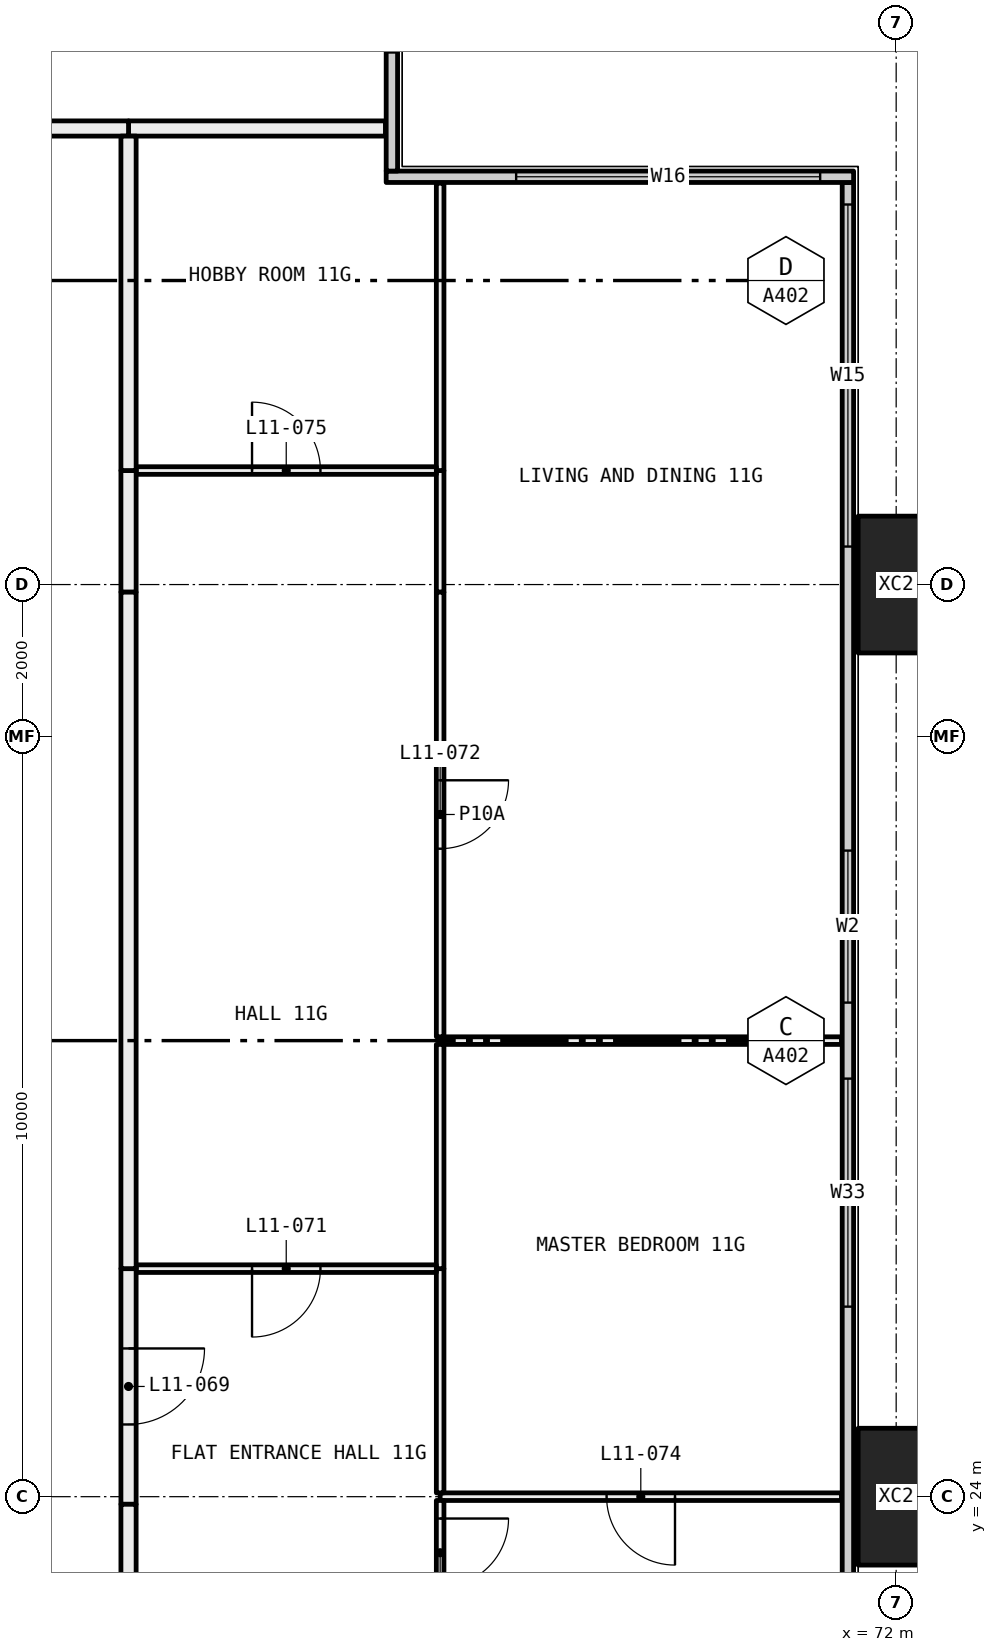
"""IFC4 building model, lengths in metres.
Left out: names, types, materials, properties, quantities, classifications, styles, units other than length and angle.
Written with IfcOpenShell. Run it as: python <this file> out.ifc"""

import sys

from ifc_helpers import new_model, si_unit, direction, frame, frame_2d, origin, origin_2d, place, context, subcontext, project, spatial, rectangle, hollow_rectangle, extrude, element, fill, save


model = new_model("IFC4")
c1 = context("Model", 3, precision=1e-05, world=origin(), true_north=direction((0.0, 1.0)))
c2 = subcontext(c1, "Body", "Model", "MODEL_VIEW")
j1 = project(units=[si_unit("LENGTHUNIT", "METRE"), si_unit("PLANEANGLEUNIT", "RADIAN")], contexts=[c1])
p1 = place(None, origin())
s1 = spatial("IfcSite", under=j1, at=p1, CompositionType="ELEMENT")
p2 = place(p1, origin())
s2 = spatial("IfcBuilding", under=s1, at=p2, CompositionType="ELEMENT")
p3 = place(p2, frame((0.0, 0.0, 50.7)))
s3 = spatial("IfcBuildingStorey", under=s2, at=p3, CompositionType="ELEMENT", Elevation=50.7)
for number, where, z_axis, x_axis in (
    (1, (72.0, 24.0, -0.4), (0.0, 0.0, 1.0), (0.0, 1.0, 0.0)),
    (2, (72.0, 36.0, -0.4), (0.0, 0.0, 1.0), (0.0, 1.0, 0.0)),
):
    element("IfcColumn", number, at=place(p3, frame(where, z_axis=z_axis, x_axis=x_axis)), inside=s3, PredefinedType="COLUMN", context=c2, shape_type="SweptSolid", body=[
        extrude(hollow_rectangle(XDim=1.8, YDim=1.0, WallThickness=0.07, at=origin_2d()), origin(), (0.0, 0.0, 1.0), 3.45),
    ])
p4 = place(p3, frame((71.365, 6.71, 0.0), z_axis=(0.0, 0.0, 1.0), x_axis=(0.0, 1.0, 0.0)))
e3 = element("IfcWall", 3, at=p4, inside=s3, PredefinedType="ELEMENTEDWALL", context=c2, shape_type="SweptSolid", body=[
    extrude(rectangle(XDim=34.58, YDim=0.15, at=frame_2d((17.29, 0.0))), origin(), (0.0, 0.0, 1.0), 3.05),
])
p5 = place(p4, frame((0.29, 0.0, 0.45)))
e4 = element("IfcOpeningElement", 4, at=p5, cuts=e3, PredefinedType="OPENING", context=c2, shape_type="SweptSolid", body=[
    extrude(rectangle(XDim=4.5, YDim=2.55, at=frame_2d((2.25, 1.275))), frame((0.0, 0.085, 0.0), z_axis=(0.0, -1.0, 0.0), x_axis=(1.0, 0.0, 0.0)), (0.0, 0.0, 1.0), 0.17),
])
p6 = place(p4, frame((7.79, 0.0, 0.45)))
e5 = element("IfcOpeningElement", 5, at=p6, cuts=e3, PredefinedType="OPENING", context=c2, shape_type="SweptSolid", body=[
    extrude(rectangle(XDim=3.0, YDim=2.55, at=frame_2d((1.5, 1.275))), frame((0.0, 0.085, 0.0), z_axis=(0.0, -1.0, 0.0), x_axis=(1.0, 0.0, 0.0)), (0.0, 0.0, 1.0), 0.17),
])
p7 = place(p4, frame((11.79, 0.0, 0.45)))
e6 = element("IfcOpeningElement", 6, at=p7, cuts=e3, PredefinedType="OPENING", context=c2, shape_type="SweptSolid", body=[
    extrude(rectangle(XDim=3.0, YDim=2.55, at=frame_2d((1.5, 1.275))), frame((0.0, 0.085, 0.0), z_axis=(0.0, -1.0, 0.0), x_axis=(1.0, 0.0, 0.0)), (0.0, 0.0, 1.0), 0.17),
])
p8 = place(p4, frame((19.79, 0.0, 0.45)))
e7 = element("IfcOpeningElement", 7, at=p8, cuts=e3, PredefinedType="OPENING", context=c2, shape_type="SweptSolid", body=[
    extrude(rectangle(XDim=3.0, YDim=2.55, at=frame_2d((1.5, 1.275))), frame((0.0, 0.085, 0.0), z_axis=(0.0, -1.0, 0.0), x_axis=(1.0, 0.0, 0.0)), (0.0, 0.0, 1.0), 0.17),
])
p9 = place(p4, frame((23.79, 0.0, 0.45)))
e8 = element("IfcOpeningElement", 8, at=p9, cuts=e3, PredefinedType="OPENING", context=c2, shape_type="SweptSolid", body=[
    extrude(rectangle(XDim=2.0, YDim=2.55, at=frame_2d((1.0, 1.275))), frame((0.0, 0.085, 0.0), z_axis=(0.0, -1.0, 0.0), x_axis=(1.0, 0.0, 0.0)), (0.0, 0.0, 1.0), 0.17),
])
p10 = place(p4, frame((29.79, 0.0, 0.45)))
e9 = element("IfcOpeningElement", 9, at=p10, cuts=e3, PredefinedType="OPENING", context=c2, shape_type="SweptSolid", body=[
    extrude(rectangle(XDim=4.5, YDim=2.55, at=frame_2d((2.25, 1.275))), frame((0.0, 0.085, 0.0), z_axis=(0.0, -1.0, 0.0), x_axis=(1.0, 0.0, 0.0)), (0.0, 0.0, 1.0), 0.17),
])
p11 = place(p3, frame((65.29, 41.365, 0.0), z_axis=(0.0, 0.0, 1.0), x_axis=(1.0, 0.0, 0.0)))
e10 = element("IfcWall", 10, at=p11, inside=s3, PredefinedType="ELEMENTEDWALL", context=c2, shape_type="SweptSolid", body=[
    extrude(rectangle(XDim=6.15, YDim=0.15, at=frame_2d((3.075, 0.0))), origin(), (0.0, 0.0, 1.0), 3.05),
])
p12 = place(p11, frame((1.71, 0.0, 0.45)))
e11 = element("IfcOpeningElement", 11, at=p12, cuts=e10, PredefinedType="OPENING", context=c2, shape_type="SweptSolid", body=[
    extrude(rectangle(XDim=4.0, YDim=2.55, at=frame_2d((2.0, 1.275))), frame((0.0, 0.085, 0.0), z_axis=(0.0, -1.0, 0.0), x_axis=(1.0, 0.0, 0.0)), (0.0, 0.0, 1.0), 0.17),
])
p13 = place(p3, frame((65.365, 41.44, 0.0), z_axis=(0.0, 0.0, 1.0), x_axis=(0.0, 1.0, 0.0)))
e12 = element("IfcWall", 12, at=p13, inside=s3, PredefinedType="ELEMENTEDWALL", context=c2, shape_type="SweptSolid", body=[
    extrude(rectangle(XDim=5.85, YDim=0.15, at=frame_2d((2.925, 0.0))), origin(), (0.0, 0.0, 1.0), 3.05),
])
p14 = place(p13, frame((1.56, 0.0, 0.45)))
e13 = element("IfcOpeningElement", 13, at=p14, cuts=e12, PredefinedType="OPENING", context=c2, shape_type="SweptSolid", body=[
    extrude(rectangle(XDim=4.0, YDim=2.55, at=frame_2d((2.0, 1.275))), frame((0.0, 0.085, 0.0), z_axis=(0.0, -1.0, 0.0), x_axis=(1.0, 0.0, 0.0)), (0.0, 0.0, 1.0), 0.17),
])
p15 = place(p3, frame((61.9, 42.0, 0.0), z_axis=(0.0, 0.0, 1.0), x_axis=(1.0, 0.0, 0.0)))
e14 = element("IfcWall", 14, at=p15, inside=s3, PredefinedType="PARTITIONING", context=c2, shape_type="SweptSolid", body=[
    extrude(rectangle(XDim=3.38, YDim=0.2, at=frame_2d((1.69, 0.0))), origin(), (0.0, 0.0, 1.0), 3.05),
])
p16 = place(p3, frame((60.0, 42.0, 0.0), z_axis=(0.0, 0.0, 1.0), x_axis=(1.0, 0.0, 0.0)))
e15 = element("IfcWall", 15, at=p16, inside=s3, PredefinedType="PARTITIONING", context=c2, shape_type="SweptSolid", body=[
    extrude(rectangle(XDim=1.9, YDim=0.2, at=frame_2d((0.95, 0.0))), origin(), (0.0, 0.0, 1.0), 3.05),
])
p17 = place(p3, frame((71.28, 24.0, 0.0), z_axis=(0.0, 0.0, 1.0), x_axis=(-1.0, 0.0, 0.0)))
e16 = element("IfcWall", 16, at=p17, inside=s3, PredefinedType="PARTITIONING", context=c2, shape_type="SweptSolid", body=[
    extrude(rectangle(XDim=5.28, YDim=0.1, at=frame_2d((2.64, 0.0))), origin(), (0.0, 0.0, 1.0), 2.45),
])
p18 = place(p17, frame((2.19, 0.0, 0.0)))
e17 = element("IfcOpeningElement", 17, at=p18, cuts=e16, PredefinedType="OPENING", context=c2, shape_type="SweptSolid", body=[
    extrude(rectangle(XDim=0.9, YDim=2.1, at=frame_2d((0.45, 1.05))), frame((0.0, 0.06, 0.0), z_axis=(0.0, -1.0, 0.0), x_axis=(1.0, 0.0, 0.0)), (0.0, 0.0, 1.0), 0.12),
])
p19 = place(p3, frame((66.0, 23.95, 0.0), z_axis=(0.0, 0.0, 1.0), x_axis=(0.0, -1.0, 0.0)))
e18 = element("IfcWall", 18, at=p19, inside=s3, PredefinedType="PARTITIONING", context=c2, shape_type="SweptSolid", body=[
    extrude(rectangle(XDim=1.375, YDim=0.1, at=frame_2d((0.688, 0.0))), origin(), (0.0, 0.0, 1.0), 2.45),
])
p20 = place(p19, frame((0.238, 0.0, 0.0)))
e19 = element("IfcOpeningElement", 19, at=p20, cuts=e18, PredefinedType="OPENING", context=c2, shape_type="SweptSolid", body=[
    extrude(rectangle(XDim=0.9, YDim=2.1, at=frame_2d((0.45, 1.05))), frame((0.0, 0.06, 0.0), z_axis=(0.0, -1.0, 0.0), x_axis=(1.0, 0.0, 0.0)), (0.0, 0.0, 1.0), 0.12),
])
p21 = place(p3, frame((71.28, 30.0, 0.0), z_axis=(0.0, 0.0, 1.0), x_axis=(-1.0, 0.0, 0.0)))
e20 = element("IfcWall", 20, at=p21, inside=s3, PredefinedType="PARTITIONING", context=c2, shape_type="SweptSolid", body=[
    extrude(rectangle(XDim=5.28, YDim=0.1, at=frame_2d((2.64, 0.0))), origin(), (0.0, 0.0, 1.0), 3.05),
])
p22 = place(p3, frame((66.0, 27.0, 0.0), z_axis=(0.0, 0.0, 1.0), x_axis=(0.0, -1.0, 0.0)))
e21 = element("IfcWall", 21, at=p22, inside=s3, PredefinedType="PARTITIONING", context=c2, shape_type="SweptSolid", body=[
    extrude(rectangle(XDim=2.95, YDim=0.1, at=frame_2d((1.475, 0.0))), origin(), (0.0, 0.0, 1.0), 2.45),
])
p23 = place(p3, frame((66.0, 29.95, 0.0), z_axis=(0.0, 0.0, 1.0), x_axis=(0.0, -1.0, 0.0)))
e22 = element("IfcWall", 22, at=p23, inside=s3, PredefinedType="PARTITIONING", context=c2, shape_type="SweptSolid", body=[
    extrude(rectangle(XDim=2.95, YDim=0.1, at=frame_2d((1.475, 0.0))), origin(), (0.0, 0.0, 1.0), 3.05),
])
p24 = place(p3, frame((66.0, 37.5, 0.0), z_axis=(0.0, 0.0, 1.0), x_axis=(0.0, -1.0, 0.0)))
e23 = element("IfcWall", 23, at=p24, inside=s3, PredefinedType="PARTITIONING", context=c2, shape_type="SweptSolid", body=[
    extrude(rectangle(XDim=1.6, YDim=0.1, at=frame_2d((0.8, 0.0))), origin(), (0.0, 0.0, 1.0), 2.45),
])
p25 = place(p3, frame((66.0, 35.9, 0.0), z_axis=(0.0, 0.0, 1.0), x_axis=(0.0, -1.0, 0.0)))
e24 = element("IfcWall", 24, at=p25, inside=s3, PredefinedType="PARTITIONING", context=c2, shape_type="SweptSolid", body=[
    extrude(rectangle(XDim=5.85, YDim=0.1, at=frame_2d((2.925, 0.0))), origin(), (0.0, 0.0, 1.0), 3.05),
])
p26 = place(p25, frame((2.475, 0.0, 0.0)))
e25 = element("IfcOpeningElement", 25, at=p26, cuts=e24, PredefinedType="OPENING", context=c2, shape_type="SweptSolid", body=[
    extrude(rectangle(XDim=0.9, YDim=2.1, at=frame_2d((0.45, 1.05))), frame((0.0, 0.06, 0.0), z_axis=(0.0, -1.0, 0.0), x_axis=(1.0, 0.0, 0.0)), (0.0, 0.0, 1.0), 0.12),
])
p27 = place(p3, frame((66.0, 41.28, 0.0), z_axis=(0.0, 0.0, 1.0), x_axis=(0.0, -1.0, 0.0)))
e26 = element("IfcWall", 26, at=p27, inside=s3, PredefinedType="PARTITIONING", context=c2, shape_type="SweptSolid", body=[
    extrude(rectangle(XDim=3.78, YDim=0.1, at=frame_2d((1.89, 0.0))), origin(), (0.0, 0.0, 1.0), 3.05),
])
p28 = place(p3, frame((65.95, 27.0, 0.0), z_axis=(0.0, 0.0, 1.0), x_axis=(-1.0, 0.0, 0.0)))
e27 = element("IfcWall", 27, at=p28, inside=s3, PredefinedType="PARTITIONING", context=c2, shape_type="SweptSolid", body=[
    extrude(rectangle(XDim=3.95, YDim=0.1, at=frame_2d((1.975, 0.0))), origin(), (0.0, 0.0, 1.0), 3.05),
])
p29 = place(p28, frame((1.525, 0.0, 0.0)))
e28 = element("IfcOpeningElement", 28, at=p29, cuts=e27, PredefinedType="OPENING", context=c2, shape_type="SweptSolid", body=[
    extrude(rectangle(XDim=0.9, YDim=2.1, at=frame_2d((0.45, 1.05))), frame((0.0, 0.06, 0.0), z_axis=(0.0, -1.0, 0.0), x_axis=(1.0, 0.0, 0.0)), (0.0, 0.0, 1.0), 0.12),
])
p30 = place(p3, frame((61.9, 27.0, 0.0), z_axis=(0.0, 0.0, 1.0), x_axis=(0.0, -1.0, 0.0)))
e29 = element("IfcWall", 29, at=p30, inside=s3, PredefinedType="PARTITIONING", context=c2, shape_type="SweptSolid", body=[
    extrude(rectangle(XDim=3.1, YDim=0.2, at=frame_2d((1.55, 0.0))), origin(), (0.0, 0.0, 1.0), 2.45),
])
p31 = place(p30, frame((1.05, 0.0, 0.0)))
e30 = element("IfcOpeningElement", 30, at=p31, cuts=e29, PredefinedType="OPENING", context=c2, shape_type="SweptSolid", body=[
    extrude(rectangle(XDim=1.0, YDim=2.1, at=frame_2d((0.5, 1.05))), frame((0.0, 0.11, 0.0), z_axis=(0.0, -1.0, 0.0), x_axis=(1.0, 0.0, 0.0)), (0.0, 0.0, 1.0), 0.22),
])
p32 = place(p3, frame((61.9, 23.9, 0.0), z_axis=(0.0, 0.0, 1.0), x_axis=(0.0, -1.0, 0.0)))
e31 = element("IfcWall", 31, at=p32, inside=s3, PredefinedType="PARTITIONING", context=c2, shape_type="SweptSolid", body=[
    extrude(rectangle(XDim=1.4, YDim=0.2, at=frame_2d((0.7, 0.0))), origin(), (0.0, 0.0, 1.0), 3.05),
])
p33 = place(p3, frame((65.95, 37.5, 0.0), z_axis=(0.0, 0.0, 1.0), x_axis=(-1.0, 0.0, 0.0)))
e32 = element("IfcWall", 32, at=p33, inside=s3, PredefinedType="PARTITIONING", context=c2, shape_type="SweptSolid", body=[
    extrude(rectangle(XDim=3.95, YDim=0.1, at=frame_2d((1.975, 0.0))), origin(), (0.0, 0.0, 1.0), 3.05),
])
p34 = place(p33, frame((1.525, 0.0, 0.0)))
e33 = element("IfcOpeningElement", 33, at=p34, cuts=e32, PredefinedType="OPENING", context=c2, shape_type="SweptSolid", body=[
    extrude(rectangle(XDim=0.9, YDim=2.1, at=frame_2d((0.45, 1.05))), frame((0.0, 0.06, 0.0), z_axis=(0.0, -1.0, 0.0), x_axis=(1.0, 0.0, 0.0)), (0.0, 0.0, 1.0), 0.12),
])
p35 = place(p3, frame((61.9, 37.5, 0.0), z_axis=(0.0, 0.0, 1.0), x_axis=(0.0, -1.0, 0.0)))
e34 = element("IfcWall", 34, at=p35, inside=s3, PredefinedType="PARTITIONING", context=c2, shape_type="SweptSolid", body=[
    extrude(rectangle(XDim=1.6, YDim=0.2, at=frame_2d((0.8, 0.0))), origin(), (0.0, 0.0, 1.0), 2.45),
])
p36 = place(p3, frame((61.9, 35.9, 0.0), z_axis=(0.0, 0.0, 1.0), x_axis=(0.0, -1.0, 0.0)))
e35 = element("IfcWall", 35, at=p36, inside=s3, PredefinedType="PARTITIONING", context=c2, shape_type="SweptSolid", body=[
    extrude(rectangle(XDim=8.9, YDim=0.2, at=frame_2d((4.45, 0.0))), origin(), (0.0, 0.0, 1.0), 3.05),
])
p37 = place(p3, frame((61.9, 41.9, 0.0), z_axis=(0.0, 0.0, 1.0), x_axis=(0.0, -1.0, 0.0)))
e36 = element("IfcWall", 36, at=p37, inside=s3, PredefinedType="PARTITIONING", context=c2, shape_type="SweptSolid", body=[
    extrude(rectangle(XDim=4.4, YDim=0.2, at=frame_2d((2.2, 0.0))), origin(), (0.0, 0.0, 1.0), 3.05),
])
p38 = place(p8, origin())
e37 = element("IfcWindow", 37, at=p38, inside=s3, PartitioningType="SINGLE_PANEL", PredefinedType="WINDOW", context=c2, shape_type="SweptSolid", body=[
    extrude(rectangle(XDim=3.0, YDim=2.55, at=frame_2d((1.5, 1.275))), frame((0.0, 0.03, 0.0), z_axis=(0.0, -1.0, 0.0), x_axis=(1.0, 0.0, 0.0)), (0.0, 0.0, 1.0), 0.06),
])
fill(e7, e37)
p39 = place(p9, origin())
e38 = element("IfcWindow", 38, at=p39, inside=s3, PartitioningType="SINGLE_PANEL", PredefinedType="WINDOW", context=c2, shape_type="SweptSolid", body=[
    extrude(rectangle(XDim=2.0, YDim=2.55, at=frame_2d((1.0, 1.275))), frame((0.0, 0.03, 0.0), z_axis=(0.0, -1.0, 0.0), x_axis=(1.0, 0.0, 0.0)), (0.0, 0.0, 1.0), 0.06),
])
fill(e8, e38)
p40 = place(p10, origin())
e39 = element("IfcWindow", 39, at=p40, inside=s3, PartitioningType="SINGLE_PANEL", PredefinedType="WINDOW", context=c2, shape_type="SweptSolid", body=[
    extrude(rectangle(XDim=4.5, YDim=2.55, at=frame_2d((2.25, 1.275))), frame((0.0, 0.03, 0.0), z_axis=(0.0, -1.0, 0.0), x_axis=(1.0, 0.0, 0.0)), (0.0, 0.0, 1.0), 0.06),
])
fill(e9, e39)
p41 = place(p12, origin())
e40 = element("IfcWindow", 40, at=p41, inside=s3, PartitioningType="SINGLE_PANEL", PredefinedType="WINDOW", context=c2, shape_type="SweptSolid", body=[
    extrude(rectangle(XDim=4.0, YDim=2.55, at=frame_2d((2.0, 1.275))), frame((0.0, 0.03, 0.0), z_axis=(0.0, -1.0, 0.0), x_axis=(1.0, 0.0, 0.0)), (0.0, 0.0, 1.0), 0.06),
])
fill(e11, e40)
p42 = place(p31, origin())
e41 = element("IfcDoor", 41, at=p42, inside=s3, OperationType="SINGLE_SWING_RIGHT", PredefinedType="DOOR", context=c2, shape_type="SweptSolid", body=[
    extrude(rectangle(XDim=1.0, YDim=2.1, at=frame_2d((0.5, 1.05))), frame((0.0, 0.025, 0.0), z_axis=(0.0, -1.0, 0.0), x_axis=(1.0, 0.0, 0.0)), (0.0, 0.0, 1.0), 0.05),
])
fill(e30, e41)
p43 = place(p20, origin())
e42 = element("IfcDoor", 42, at=p43, inside=s3, OperationType="SINGLE_SWING_RIGHT", PredefinedType="DOOR", context=c2, shape_type="SweptSolid", body=[
    extrude(rectangle(XDim=0.9, YDim=2.1, at=frame_2d((0.45, 1.05))), frame((0.0, 0.025, 0.0), z_axis=(0.0, -1.0, 0.0), x_axis=(1.0, 0.0, 0.0)), (0.0, 0.0, 1.0), 0.05),
])
fill(e19, e42)
p44 = place(p29, origin())
e43 = element("IfcDoor", 43, at=p44, inside=s3, OperationType="SINGLE_SWING_LEFT", PredefinedType="DOOR", context=c2, shape_type="SweptSolid", body=[
    extrude(rectangle(XDim=0.9, YDim=2.1, at=frame_2d((0.45, 1.05))), frame((0.0, 0.025, 0.0), z_axis=(0.0, -1.0, 0.0), x_axis=(1.0, 0.0, 0.0)), (0.0, 0.0, 1.0), 0.05),
])
fill(e28, e43)
p45 = place(p26, origin())
e44 = element("IfcDoor", 44, at=p45, inside=s3, OperationType="SINGLE_SWING_RIGHT", PredefinedType="DOOR", context=c2, shape_type="SweptSolid", body=[
    extrude(rectangle(XDim=0.9, YDim=2.1, at=frame_2d((0.45, 1.05))), frame((0.0, 0.025, 0.0), z_axis=(0.0, -1.0, 0.0), x_axis=(1.0, 0.0, 0.0)), (0.0, 0.0, 1.0), 0.05),
])
fill(e25, e44)
p46 = place(p18, origin())
e45 = element("IfcDoor", 45, at=p46, inside=s3, OperationType="SINGLE_SWING_RIGHT", PredefinedType="DOOR", context=c2, shape_type="SweptSolid", body=[
    extrude(rectangle(XDim=0.9, YDim=2.1, at=frame_2d((0.45, 1.05))), frame((0.0, 0.025, 0.0), z_axis=(0.0, -1.0, 0.0), x_axis=(1.0, 0.0, 0.0)), (0.0, 0.0, 1.0), 0.05),
])
fill(e17, e45)
p47 = place(p34, frame((0.9, 0.0, 0.0), x_axis=(-1.0, 0.0, 0.0)))
e46 = element("IfcDoor", 46, at=p47, inside=s3, OperationType="SINGLE_SWING_RIGHT", PredefinedType="DOOR", context=c2, shape_type="SweptSolid", body=[
    extrude(rectangle(XDim=0.9, YDim=2.1, at=frame_2d((0.45, 1.05))), frame((0.0, 0.025, 0.0), z_axis=(0.0, -1.0, 0.0), x_axis=(1.0, 0.0, 0.0)), (0.0, 0.0, 1.0), 0.05),
])
fill(e33, e46)
save(model, sys.argv[1])
